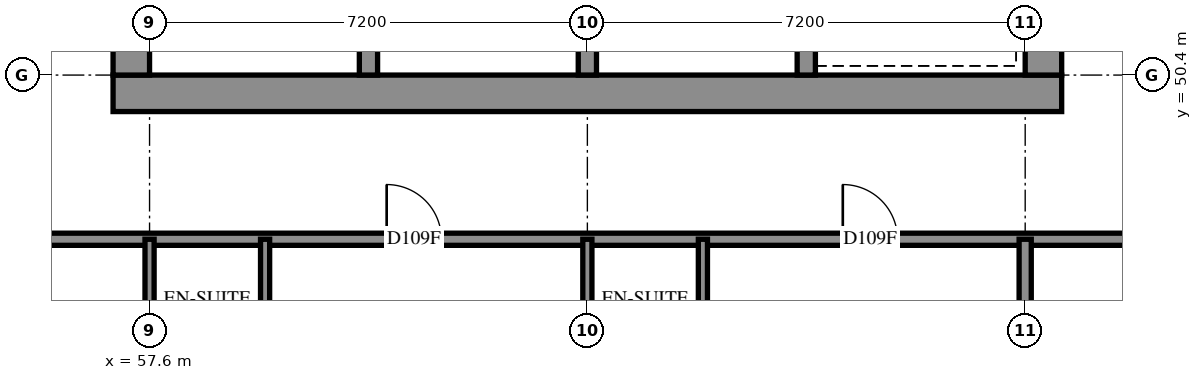
"""IFC4 building model, lengths in metres.
Left out: names, types, materials, properties, quantities, classifications, styles, units other than length and angle.
Written with IfcOpenShell. Run it as: python <this file> out.ifc"""

import sys

from ifc_helpers import new_model, si_unit, direction, frame, frame_2d, origin, place, context, subcontext, project, spatial, rectangle, extrude, element, fill, save


model = new_model("IFC4")
c1 = context("Model", 3, precision=1e-05, world=origin(), true_north=direction((0.0, 1.0)))
c2 = subcontext(c1, "Body", "Model", "MODEL_VIEW")
j1 = project(units=[si_unit("LENGTHUNIT", "METRE"), si_unit("PLANEANGLEUNIT", "RADIAN")], contexts=[c1])
p1 = place(None, origin())
s1 = spatial("IfcSite", under=j1, at=p1, CompositionType="ELEMENT")
p2 = place(p1, origin())
s2 = spatial("IfcBuilding", under=s1, at=p2, CompositionType="ELEMENT")
p3 = place(p2, frame((0.0, 0.0, 159.2)))
s3 = spatial("IfcBuildingStorey", under=s2, at=p3, CompositionType="ELEMENT", Elevation=159.2)
p4 = place(p3, frame((57.0, 50.1, -0.3), z_axis=(0.0, 0.0, 1.0), x_axis=(1.0, 0.0, 0.0)))
e1 = element("IfcWall", 1, at=p4, inside=s3, PredefinedType="SHEAR", context=c2, shape_type="SweptSolid", body=[
    extrude(rectangle(XDim=15.6, YDim=0.6, at=frame_2d((7.8, 0.0))), origin(), (0.0, 0.0, 1.0), 2.7),
])
p5 = place(p3, frame((57.3, 50.4, -0.3), z_axis=(0.0, 0.0, 1.0), x_axis=(0.0, 1.0, 0.0)))
e2 = element("IfcWall", 2, at=p5, inside=s3, PredefinedType="SHEAR", context=c2, shape_type="SweptSolid", body=[
    extrude(rectangle(XDim=14.4, YDim=0.6, at=frame_2d((7.2, 0.0))), origin(), (0.0, 0.0, 1.0), 2.7),
])
p6 = place(p5, frame((4.55, 0.0, 0.3)))
e3 = element("IfcOpeningElement", 3, at=p6, cuts=e2, PredefinedType="OPENING", context=c2, shape_type="SweptSolid", body=[
    extrude(rectangle(XDim=1.1, YDim=2.1, at=frame_2d((0.55, 1.05))), frame((0.0, 0.31, 0.0), z_axis=(0.0, -1.0, 0.0), x_axis=(1.0, 0.0, 0.0)), (0.0, 0.0, 1.0), 0.62),
])
p7 = place(p5, frame((11.35, 0.0, 0.3)))
e4 = element("IfcOpeningElement", 4, at=p7, cuts=e2, PredefinedType="OPENING", context=c2, shape_type="SweptSolid", body=[
    extrude(rectangle(XDim=1.1, YDim=2.1, at=frame_2d((0.55, 1.05))), frame((0.0, 0.31, 0.0), z_axis=(0.0, -1.0, 0.0), x_axis=(1.0, 0.0, 0.0)), (0.0, 0.0, 1.0), 0.62),
])
p8 = place(p3, frame((72.3, 50.4, -0.3), z_axis=(0.0, 0.0, 1.0), x_axis=(0.0, 1.0, 0.0)))
e5 = element("IfcWall", 5, at=p8, inside=s3, PredefinedType="SHEAR", context=c2, shape_type="SweptSolid", body=[
    extrude(rectangle(XDim=14.4, YDim=0.6, at=frame_2d((7.2, 0.0))), origin(), (0.0, 0.0, 1.0), 2.7),
])
p9 = place(p8, frame((4.55, 0.0, 0.3)))
e6 = element("IfcOpeningElement", 6, at=p9, cuts=e5, PredefinedType="OPENING", context=c2, shape_type="SweptSolid", body=[
    extrude(rectangle(XDim=1.1, YDim=2.1, at=frame_2d((0.55, 1.05))), frame((0.0, 0.31, 0.0), z_axis=(0.0, -1.0, 0.0), x_axis=(1.0, 0.0, 0.0)), (0.0, 0.0, 1.0), 0.62),
])
p10 = place(p8, frame((11.35, 0.0, 0.3)))
e7 = element("IfcOpeningElement", 7, at=p10, cuts=e5, PredefinedType="OPENING", context=c2, shape_type="SweptSolid", body=[
    extrude(rectangle(XDim=1.1, YDim=2.1, at=frame_2d((0.55, 1.05))), frame((0.0, 0.31, 0.0), z_axis=(0.0, -1.0, 0.0), x_axis=(1.0, 0.0, 0.0)), (0.0, 0.0, 1.0), 0.62),
])
for number, where, z_axis, x_axis in (
    (8, (61.2, 50.4, 0.0), (0.0, 0.0, 1.0), (0.0, 1.0, 0.0)),
    (9, (64.8, 50.4, 0.0), (0.0, 0.0, 1.0), (0.0, 1.0, 0.0)),
    (10, (68.4, 50.4, 0.0), (0.0, 0.0, 1.0), (0.0, 1.0, 0.0)),
):
    element("IfcWall", number, at=place(p3, frame(where, z_axis=z_axis, x_axis=x_axis)), inside=s3, PredefinedType="SOLIDWALL", context=c2, shape_type="SweptSolid", body=[
        extrude(rectangle(XDim=3.3, YDim=0.3, at=frame_2d((1.65, 0.0))), origin(), (0.0, 0.0, 1.0), 3.1),
    ])
p11 = place(p3, frame((54.9, 47.7, 0.0), z_axis=(0.0, 0.0, 1.0), x_axis=(1.0, 0.0, 0.0)))
e11 = element("IfcWall", 11, at=p11, inside=s3, PredefinedType="PARTITIONING", context=c2, shape_type="SweptSolid", body=[
    extrude(rectangle(XDim=19.326, YDim=0.2, at=frame_2d((9.663, 0.0))), origin(), (0.0, 0.0, 1.0), 3.1),
])
p12 = place(p11, frame((6.599, 0.0, 0.0)))
e12 = element("IfcOpeningElement", 12, at=p12, cuts=e11, PredefinedType="OPENING", context=c2, shape_type="SweptSolid", body=[
    extrude(rectangle(XDim=0.9, YDim=2.1, at=frame_2d((0.45, 1.05))), frame((0.0, 0.11, 0.0), z_axis=(0.0, -1.0, 0.0), x_axis=(1.0, 0.0, 0.0)), (0.0, 0.0, 1.0), 0.22),
])
p13 = place(p11, frame((14.101, 0.0, 0.0)))
e13 = element("IfcOpeningElement", 13, at=p13, cuts=e11, PredefinedType="OPENING", context=c2, shape_type="SweptSolid", body=[
    extrude(rectangle(XDim=0.9, YDim=2.1, at=frame_2d((0.45, 1.05))), frame((0.0, 0.11, 0.0), z_axis=(0.0, -1.0, 0.0), x_axis=(1.0, 0.0, 0.0)), (0.0, 0.0, 1.0), 0.22),
])
p14 = place(p3, frame((72.0, 43.756, 0.0), z_axis=(0.0, 0.0, 1.0), x_axis=(0.0, 1.0, 0.0)))
e14 = element("IfcWall", 14, at=p14, inside=s3, PredefinedType="PARTITIONING", context=c2, shape_type="SweptSolid", body=[
    extrude(rectangle(XDim=3.944, YDim=0.2, at=frame_2d((1.972, 0.0))), origin(), (0.0, 0.0, 1.0), 3.1),
])
for number, where, z_axis, x_axis in (
    (15, (59.5, 45.3, 0.0), (0.0, 0.0, 1.0), (0.0, 1.0, 0.0)),
    (16, (57.6, 45.3, 0.0), (0.0, 0.0, 1.0), (0.0, 1.0, 0.0)),
    (17, (66.7, 45.3, 0.0), (0.0, 0.0, 1.0), (0.0, 1.0, 0.0)),
    (18, (64.8, 45.3, 0.0), (0.0, 0.0, 1.0), (0.0, 1.0, 0.0)),
):
    element("IfcWall", number, at=place(p3, frame(where, z_axis=z_axis, x_axis=x_axis)), inside=s3, PredefinedType="PARTITIONING", context=c2, shape_type="SweptSolid", body=[
        extrude(rectangle(XDim=2.4, YDim=0.15, at=frame_2d((1.2, 0.0))), origin(), (0.0, 0.0, 1.0), 3.1),
    ])
p15 = place(p12, origin())
e19 = element("IfcDoor", 19, at=p15, inside=s3, OperationType="SINGLE_SWING_LEFT", PredefinedType="DOOR", context=c2, shape_type="SweptSolid", body=[
    extrude(rectangle(XDim=0.9, YDim=2.1, at=frame_2d((0.45, 1.05))), frame((0.0, 0.025, 0.0), z_axis=(0.0, -1.0, 0.0), x_axis=(1.0, 0.0, 0.0)), (0.0, 0.0, 1.0), 0.05),
])
fill(e12, e19)
p16 = place(p13, origin())
e20 = element("IfcDoor", 20, at=p16, inside=s3, OperationType="SINGLE_SWING_LEFT", PredefinedType="DOOR", context=c2, shape_type="SweptSolid", body=[
    extrude(rectangle(XDim=0.9, YDim=2.1, at=frame_2d((0.45, 1.05))), frame((0.0, 0.025, 0.0), z_axis=(0.0, -1.0, 0.0), x_axis=(1.0, 0.0, 0.0)), (0.0, 0.0, 1.0), 0.05),
])
fill(e13, e20)
save(model, sys.argv[1])
